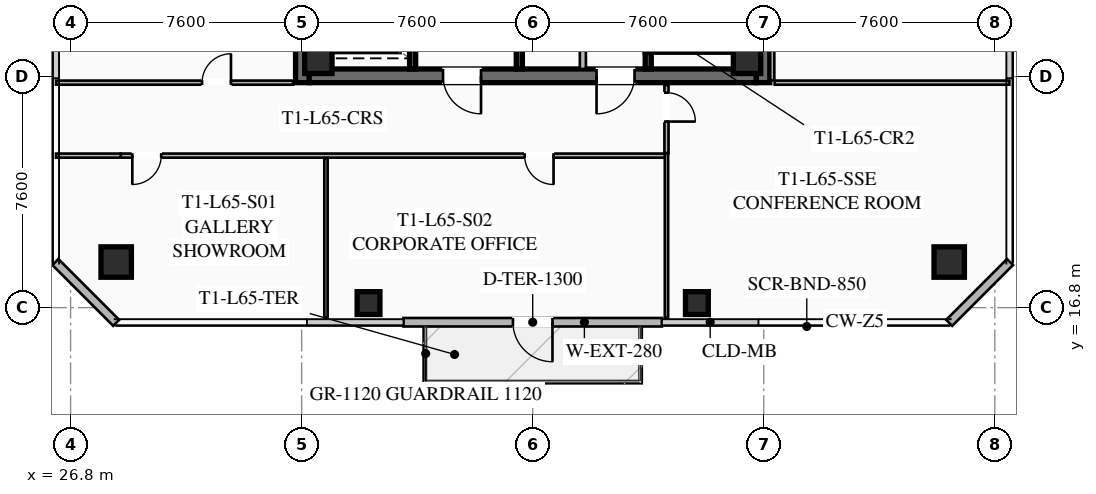
"""IFC4 building model, lengths in metres.
Left out: names, types, materials, properties, quantities, classifications, styles, units other than length and angle.
Written with IfcOpenShell. Run it as: python <this file> out.ifc"""

import sys

from ifc_helpers import new_model, si_unit, direction, frame, frame_2d, origin, origin_2d, place, context, subcontext, project, spatial, rectangle, hollow_rectangle, extrude, element, fill, save


model = new_model("IFC4")
c1 = context("Model", 3, precision=1e-05, world=origin(), true_north=direction((0.0, 1.0)))
c2 = subcontext(c1, "Body", "Model", "MODEL_VIEW")
j1 = project(units=[si_unit("LENGTHUNIT", "METRE"), si_unit("PLANEANGLEUNIT", "RADIAN")], contexts=[c1])
p1 = place(None, origin())
s1 = spatial("IfcSite", under=j1, at=p1, CompositionType="ELEMENT")
p2 = place(p1, origin())
s2 = spatial("IfcBuilding", under=s1, at=p2, CompositionType="ELEMENT")
p3 = place(p2, frame((0.0, 0.0, 239.7)))
s3 = spatial("IfcBuildingStorey", under=s2, at=p3, CompositionType="ELEMENT", Elevation=239.7)
for number, where, z_axis, x_axis in (
    (1, (34.425, 24.2, 0.0), (0.0, 0.0, 1.0), (0.0, 1.0, 0.0)),
    (2, (49.575, 39.8, 0.0), (0.0, 0.0, 1.0), (0.0, -1.0, 0.0)),
):
    element("IfcWall", number, at=place(p3, frame(where, z_axis=z_axis, x_axis=x_axis)), inside=s3, PredefinedType="SHEAR", context=c2, shape_type="SweptSolid", body=[
        extrude(rectangle(XDim=15.6, YDim=0.45, at=frame_2d((7.8, 0.0))), origin(), (0.0, 0.0, 1.0), 3.55),
    ])
p4 = place(p3, frame((49.35, 24.425, 0.0), z_axis=(0.0, 0.0, 1.0), x_axis=(-1.0, 0.0, 0.0)))
e3 = element("IfcWall", 3, at=p4, inside=s3, PredefinedType="SHEAR", context=c2, shape_type="SweptSolid", body=[
    extrude(rectangle(XDim=14.7, YDim=0.45, at=frame_2d((7.35, 0.0))), origin(), (0.0, 0.0, 1.0), 3.55),
])
p5 = place(p4, frame((9.05, 0.0, 0.0)))
e4 = element("IfcOpeningElement", 4, at=p5, cuts=e3, PredefinedType="OPENING", context=c2, shape_type="SweptSolid", body=[
    extrude(rectangle(XDim=1.25, YDim=2.25, at=frame_2d((0.625, 1.125))), frame((0.0, 0.235, 0.0), z_axis=(0.0, -1.0, 0.0), x_axis=(1.0, 0.0, 0.0)), (0.0, 0.0, 1.0), 0.47),
])
p6 = place(p4, frame((4.0, 0.0, 0.0)))
e5 = element("IfcOpeningElement", 5, at=p6, cuts=e3, PredefinedType="OPENING", context=c2, shape_type="SweptSolid", body=[
    extrude(rectangle(XDim=1.25, YDim=2.25, at=frame_2d((0.625, 1.125))), frame((0.0, 0.235, 0.0), z_axis=(0.0, -1.0, 0.0), x_axis=(1.0, 0.0, 0.0)), (0.0, 0.0, 1.0), 0.47),
])
for number, where, z_axis, x_axis in (
    (6, (34.95, 24.95, 0.0), (0.0, 0.0, 1.0), (1.0, 0.0, 0.0)),
    (7, (49.05, 24.95, 0.0), (0.0, 0.0, 1.0), (1.0, 0.0, 0.0)),
):
    element("IfcColumn", number, at=place(p3, frame(where, z_axis=z_axis, x_axis=x_axis)), inside=s3, PredefinedType="COLUMN", context=c2, shape_type="SweptSolid", body=[
        extrude(hollow_rectangle(XDim=0.9, YDim=0.9, WallThickness=0.04, at=origin_2d()), origin(), (0.0, 0.0, 1.0), 3.37),
    ])
for number, where, z_axis, x_axis in (
    (8, (28.3, 18.3, 0.0), (0.0, 0.0, 1.0), (1.0, 0.0, 0.0)),
    (9, (55.7, 18.3, 0.0), (0.0, 0.0, 1.0), (1.0, 0.0, 0.0)),
):
    element("IfcColumn", number, at=place(p3, frame(where, z_axis=z_axis, x_axis=x_axis)), inside=s3, PredefinedType="COLUMN", context=c2, shape_type="SweptSolid", body=[
        extrude(hollow_rectangle(XDim=1.0, YDim=1.0, WallThickness=0.04, at=origin_2d()), origin(), (0.0, 0.0, 1.0), 3.37),
    ])
for number, where, z_axis, x_axis in (
    (10, (36.6, 16.95, 0.0), (0.0, 0.0, 1.0), (1.0, 0.0, 0.0)),
    (11, (47.4, 16.95, 0.0), (0.0, 0.0, 1.0), (1.0, 0.0, 0.0)),
):
    element("IfcColumn", number, at=place(p3, frame(where, z_axis=z_axis, x_axis=x_axis)), inside=s3, PredefinedType="COLUMN", context=c2, shape_type="SweptSolid", body=[
        extrude(hollow_rectangle(XDim=0.75, YDim=0.75, WallThickness=0.032, at=origin_2d()), origin(), (0.0, 0.0, 1.0), 3.37),
    ])
p7 = place(p3, frame((46.25, 16.32, 0.0), z_axis=(0.0, 0.0, 1.0), x_axis=(-1.0, 0.0, 0.0)))
e12 = element("IfcWall", 12, at=p7, inside=s3, PredefinedType="SOLIDWALL", context=c2, shape_type="SweptSolid", body=[
    extrude(rectangle(XDim=8.5, YDim=0.28, at=frame_2d((4.25, 0.0))), origin(), (0.0, 0.0, 1.0), 3.37),
])
p8 = place(p7, frame((3.6, 0.0, 0.0)))
e13 = element("IfcOpeningElement", 13, at=p8, cuts=e12, PredefinedType="OPENING", context=c2, shape_type="SweptSolid", body=[
    extrude(rectangle(XDim=1.3, YDim=2.15, at=frame_2d((0.65, 1.075))), frame((0.0, 0.15, 0.0), z_axis=(0.0, -1.0, 0.0), x_axis=(1.0, 0.0, 0.0)), (0.0, 0.0, 1.0), 0.3),
])
for number, where, z_axis, x_axis in (
    (14, (28.3, 16.3, 0.0), (0.0, 0.0, 1.0), (-0.707, 0.707, 0.0)),
    (15, (57.7, 18.3, 0.0), (0.0, 0.0, 1.0), (-0.707, -0.707, 0.0)),
):
    element("IfcWall", number, at=place(p3, frame(where, z_axis=z_axis, x_axis=x_axis)), inside=s3, PredefinedType="SOLIDWALL", context=c2, shape_type="SweptSolid", body=[
        extrude(rectangle(XDim=2.828, YDim=0.28, at=frame_2d((1.414, 0.0))), origin(), (0.0, 0.0, 1.0), 3.37),
    ])
p9 = place(p3, frame((45.8, 32.8, 0.0), z_axis=(0.0, 0.0, 1.0), x_axis=(0.0, -1.0, 0.0)))
e16 = element("IfcWall", 16, at=p9, inside=s3, PredefinedType="SHEAR", context=c2, shape_type="SweptSolid", body=[
    extrude(rectangle(XDim=8.15, YDim=0.2, at=frame_2d((4.075, 0.0))), origin(), (0.0, 0.0, 1.0), 3.37),
])
p10 = place(p9, frame((0.45, 0.0, 0.0)))
e17 = element("IfcOpeningElement", 17, at=p10, cuts=e16, PredefinedType="OPENING", context=c2, shape_type="SweptSolid", body=[
    extrude(rectangle(XDim=1.15, YDim=2.2, at=frame_2d((0.575, 1.1))), frame((0.0, 0.11, 0.0), z_axis=(0.0, -1.0, 0.0), x_axis=(1.0, 0.0, 0.0)), (0.0, 0.0, 1.0), 0.22),
])
p11 = place(p3, frame((41.56, 24.65, 0.0), z_axis=(0.0, 0.0, 1.0), x_axis=(0.0, 1.0, 0.0)))
e18 = element("IfcWall", 18, at=p11, inside=s3, PredefinedType="SHEAR", context=c2, shape_type="SweptSolid", body=[
    extrude(rectangle(XDim=14.7, YDim=0.2, at=frame_2d((7.35, 0.0))), origin(), (0.0, 0.0, 1.0), 3.37),
])
p12 = place(p3, frame((38.05, 24.65, 0.0), z_axis=(0.0, 0.0, 1.0), x_axis=(0.0, 1.0, 0.0)))
e19 = element("IfcWall", 19, at=p12, inside=s3, PredefinedType="SHEAR", context=c2, shape_type="SweptSolid", body=[
    extrude(rectangle(XDim=6.55, YDim=0.2, at=frame_2d((3.275, 0.0))), origin(), (0.0, 0.0, 1.0), 3.37),
])
p13 = place(p12, frame((4.975, 0.0, 0.0)))
e20 = element("IfcOpeningElement", 20, at=p13, cuts=e19, PredefinedType="OPENING", context=c2, shape_type="SweptSolid", body=[
    extrude(rectangle(XDim=1.3, YDim=2.25, at=frame_2d((0.65, 1.125))), frame((0.0, 0.11, 0.0), z_axis=(0.0, -1.0, 0.0), x_axis=(1.0, 0.0, 0.0)), (0.0, 0.0, 1.0), 0.22),
])
p14 = place(p12, frame((2.975, 0.0, 0.0)))
e21 = element("IfcOpeningElement", 21, at=p14, cuts=e19, PredefinedType="OPENING", context=c2, shape_type="SweptSolid", body=[
    extrude(rectangle(XDim=1.3, YDim=2.25, at=frame_2d((0.65, 1.125))), frame((0.0, 0.11, 0.0), z_axis=(0.0, -1.0, 0.0), x_axis=(1.0, 0.0, 0.0)), (0.0, 0.0, 1.0), 0.22),
])
p15 = place(p12, frame((0.775, 0.0, 0.0)))
e22 = element("IfcOpeningElement", 22, at=p15, cuts=e19, PredefinedType="OPENING", context=c2, shape_type="SweptSolid", body=[
    extrude(rectangle(XDim=1.3, YDim=2.25, at=frame_2d((0.65, 1.125))), frame((0.0, 0.11, 0.0), z_axis=(0.0, -1.0, 0.0), x_axis=(1.0, 0.0, 0.0)), (0.0, 0.0, 1.0), 0.22),
])
p16 = place(p3, frame((43.65, 24.65, 0.0), z_axis=(0.0, 0.0, 1.0), x_axis=(0.0, 1.0, 0.0)))
e23 = element("IfcWall", 23, at=p16, inside=s3, PredefinedType="SOLIDWALL", context=c2, shape_type="SweptSolid", body=[
    extrude(rectangle(XDim=7.0, YDim=0.2, at=frame_2d((3.5, 0.0))), origin(), (0.0, 0.0, 1.0), 2.723),
])
p17 = place(p16, frame((0.85, 0.0, 0.0)))
e24 = element("IfcOpeningElement", 24, at=p17, cuts=e23, PredefinedType="OPENING", context=c2, shape_type="SweptSolid", body=[
    extrude(rectangle(XDim=0.95, YDim=2.05, at=frame_2d((0.475, 1.025))), frame((0.0, 0.11, 0.0), z_axis=(0.0, -1.0, 0.0), x_axis=(1.0, 0.0, 0.0)), (0.0, 0.0, 1.0), 0.22),
])
p18 = place(p16, frame((4.8, 0.0, 0.0)))
e25 = element("IfcOpeningElement", 25, at=p18, cuts=e23, PredefinedType="OPENING", context=c2, shape_type="SweptSolid", body=[
    extrude(rectangle(XDim=1.05, YDim=2.2, at=frame_2d((0.525, 1.1))), frame((0.0, 0.11, 0.0), z_axis=(0.0, -1.0, 0.0), x_axis=(1.0, 0.0, 0.0)), (0.0, 0.0, 1.0), 0.22),
])
p19 = place(p3, frame((46.4, 21.8, 0.0), z_axis=(0.0, 0.0, 1.0), x_axis=(-1.0, 0.0, 0.0)))
e26 = element("IfcWall", 26, at=p19, inside=s3, PredefinedType="PARTITIONING", context=c2, shape_type="SweptSolid", body=[
    extrude(rectangle(XDim=17.95, YDim=0.135, at=frame_2d((8.975, 0.0))), origin(), (0.0, 0.0, 1.0), 2.723),
])
p20 = place(p19, frame((16.62, 0.0, 0.0)))
e27 = element("IfcOpeningElement", 27, at=p20, cuts=e26, PredefinedType="OPENING", context=c2, shape_type="SweptSolid", body=[
    extrude(rectangle(XDim=0.95, YDim=2.05, at=frame_2d((0.475, 1.025))), frame((0.0, 0.077, 0.0), z_axis=(0.0, -1.0, 0.0), x_axis=(1.0, 0.0, 0.0)), (0.0, 0.0, 1.0), 0.155),
])
p21 = place(p19, frame((3.714, 0.0, 0.0)))
e28 = element("IfcOpeningElement", 28, at=p21, cuts=e26, PredefinedType="OPENING", context=c2, shape_type="SweptSolid", body=[
    extrude(rectangle(XDim=0.95, YDim=2.05, at=frame_2d((0.475, 1.025))), frame((0.0, 0.077, 0.0), z_axis=(0.0, -1.0, 0.0), x_axis=(1.0, 0.0, 0.0)), (0.0, 0.0, 1.0), 0.155),
])
p22 = place(p3, frame((26.32, 21.8, 0.0), z_axis=(0.0, 0.0, 1.0), x_axis=(1.0, 0.0, 0.0)))
e29 = element("IfcWall", 29, at=p22, inside=s3, PredefinedType="PARTITIONING", context=c2, shape_type="SweptSolid", body=[
    extrude(rectangle(XDim=2.13, YDim=0.135, at=frame_2d((1.065, 0.0))), origin(), (0.0, 0.0, 1.0), 2.723),
])
p23 = place(p3, frame((46.4, 24.12, 0.0), z_axis=(0.0, 0.0, 1.0), x_axis=(0.0, -1.0, 0.0)))
e30 = element("IfcWall", 30, at=p23, inside=s3, PredefinedType="PARTITIONING", context=c2, shape_type="SweptSolid", body=[
    extrude(rectangle(XDim=2.24, YDim=0.135, at=frame_2d((1.12, 0.0))), origin(), (0.0, 0.0, 1.0), 2.723),
])
p24 = place(p23, frame((0.25, 0.0, 0.0)))
e31 = element("IfcOpeningElement", 31, at=p24, cuts=e30, PredefinedType="OPENING", context=c2, shape_type="SweptSolid", body=[
    extrude(rectangle(XDim=0.95, YDim=2.05, at=frame_2d((0.475, 1.025))), frame((0.0, 0.077, 0.0), z_axis=(0.0, -1.0, 0.0), x_axis=(1.0, 0.0, 0.0)), (0.0, 0.0, 1.0), 0.155),
])
p25 = place(p3, frame((35.2, 16.47, 0.0), z_axis=(0.0, 0.0, 1.0), x_axis=(0.0, 1.0, 0.0)))
e32 = element("IfcWall", 32, at=p25, inside=s3, PredefinedType="PARTITIONING", context=c2, shape_type="SweptSolid", body=[
    extrude(rectangle(XDim=5.25, YDim=0.11, at=frame_2d((2.625, 0.0))), origin(), (0.0, 0.0, 1.0), 2.723),
])
p26 = place(p3, frame((46.4, 16.47, 0.0), z_axis=(0.0, 0.0, 1.0), x_axis=(0.0, 1.0, 0.0)))
e33 = element("IfcWall", 33, at=p26, inside=s3, PredefinedType="PARTITIONING", context=c2, shape_type="SweptSolid", body=[
    extrude(rectangle(XDim=5.41, YDim=0.11, at=frame_2d((2.705, 0.0))), origin(), (0.0, 0.0, 1.0), 2.723),
])
p27 = place(p3, frame((49.88, 39.72, 0.0), z_axis=(0.0, 0.0, 1.0), x_axis=(0.0, -1.0, 0.0)))
e34 = element("IfcWall", 34, at=p27, inside=s3, PredefinedType="PARTITIONING", context=c2, shape_type="SweptSolid", body=[
    extrude(rectangle(XDim=15.44, YDim=0.135, at=frame_2d((7.72, 0.0))), origin(), (0.0, 0.0, 1.0), 2.723),
])
p28 = place(p3, frame((49.96, 24.2, 0.0), z_axis=(0.0, 0.0, 1.0), x_axis=(1.0, 0.0, 0.0)))
e35 = element("IfcWall", 35, at=p28, inside=s3, PredefinedType="PARTITIONING", context=c2, shape_type="SweptSolid", body=[
    extrude(rectangle(XDim=7.72, YDim=0.135, at=frame_2d((3.86, 0.0))), origin(), (0.0, 0.0, 1.0), 2.723),
])
p29 = place(p3, frame((26.32, 24.2, 0.0), z_axis=(0.0, 0.0, 1.0), x_axis=(1.0, 0.0, 0.0)))
e36 = element("IfcWall", 36, at=p29, inside=s3, PredefinedType="PARTITIONING", context=c2, shape_type="SweptSolid", body=[
    extrude(rectangle(XDim=7.8, YDim=0.135, at=frame_2d((3.9, 0.0))), origin(), (0.0, 0.0, 1.0), 2.723),
])
p30 = place(p29, frame((4.805, 0.0, 0.0)))
e37 = element("IfcOpeningElement", 37, at=p30, cuts=e36, PredefinedType="OPENING", context=c2, shape_type="SweptSolid", body=[
    extrude(rectangle(XDim=0.95, YDim=2.05, at=frame_2d((0.475, 1.025))), frame((0.0, 0.077, 0.0), z_axis=(0.0, -1.0, 0.0), x_axis=(1.0, 0.0, 0.0)), (0.0, 0.0, 1.0), 0.155),
])
p31 = place(p8, origin())
e38 = element("IfcDoor", 38, at=p31, inside=s3, OperationType="SINGLE_SWING_LEFT", PredefinedType="DOOR", context=c2, shape_type="SweptSolid", body=[
    extrude(rectangle(XDim=1.3, YDim=2.15, at=frame_2d((0.65, 1.075))), frame((0.0, 0.025, 0.0), z_axis=(0.0, -1.0, 0.0), x_axis=(1.0, 0.0, 0.0)), (0.0, 0.0, 1.0), 0.05),
])
fill(e13, e38)
p32 = place(p5, origin())
e39 = element("IfcDoor", 39, at=p32, inside=s3, OperationType="SINGLE_SWING_LEFT", PredefinedType="DOOR", context=c2, shape_type="SweptSolid", body=[
    extrude(rectangle(XDim=1.25, YDim=2.25, at=frame_2d((0.625, 1.125))), frame((0.0, 0.025, 0.0), z_axis=(0.0, -1.0, 0.0), x_axis=(1.0, 0.0, 0.0)), (0.0, 0.0, 1.0), 0.05),
])
fill(e4, e39)
p33 = place(p6, origin())
e40 = element("IfcDoor", 40, at=p33, inside=s3, OperationType="SINGLE_SWING_RIGHT", PredefinedType="DOOR", context=c2, shape_type="SweptSolid", body=[
    extrude(rectangle(XDim=1.25, YDim=2.25, at=frame_2d((0.625, 1.125))), frame((0.0, 0.025, 0.0), z_axis=(0.0, -1.0, 0.0), x_axis=(1.0, 0.0, 0.0)), (0.0, 0.0, 1.0), 0.05),
])
fill(e5, e40)
p34 = place(p20, origin())
e41 = element("IfcDoor", 41, at=p34, inside=s3, OperationType="SINGLE_SWING_RIGHT", PredefinedType="DOOR", context=c2, shape_type="SweptSolid", body=[
    extrude(rectangle(XDim=0.95, YDim=2.05, at=frame_2d((0.475, 1.025))), frame((0.0, 0.025, 0.0), z_axis=(0.0, -1.0, 0.0), x_axis=(1.0, 0.0, 0.0)), (0.0, 0.0, 1.0), 0.05),
])
fill(e27, e41)
p35 = place(p21, origin())
e42 = element("IfcDoor", 42, at=p35, inside=s3, OperationType="SINGLE_SWING_LEFT", PredefinedType="DOOR", context=c2, shape_type="SweptSolid", body=[
    extrude(rectangle(XDim=0.95, YDim=2.05, at=frame_2d((0.475, 1.025))), frame((0.0, 0.025, 0.0), z_axis=(0.0, -1.0, 0.0), x_axis=(1.0, 0.0, 0.0)), (0.0, 0.0, 1.0), 0.05),
])
fill(e28, e42)
p36 = place(p24, origin())
e43 = element("IfcDoor", 43, at=p36, inside=s3, OperationType="SINGLE_SWING_RIGHT", PredefinedType="DOOR", context=c2, shape_type="SweptSolid", body=[
    extrude(rectangle(XDim=0.95, YDim=2.05, at=frame_2d((0.475, 1.025))), frame((0.0, 0.025, 0.0), z_axis=(0.0, -1.0, 0.0), x_axis=(1.0, 0.0, 0.0)), (0.0, 0.0, 1.0), 0.05),
])
fill(e31, e43)
p37 = place(p30, origin())
e44 = element("IfcDoor", 44, at=p37, inside=s3, OperationType="SINGLE_SWING_RIGHT", PredefinedType="DOOR", context=c2, shape_type="SweptSolid", body=[
    extrude(rectangle(XDim=0.95, YDim=2.05, at=frame_2d((0.475, 1.025))), frame((0.0, 0.025, 0.0), z_axis=(0.0, -1.0, 0.0), x_axis=(1.0, 0.0, 0.0)), (0.0, 0.0, 1.0), 0.05),
])
fill(e37, e44)
save(model, sys.argv[1])
